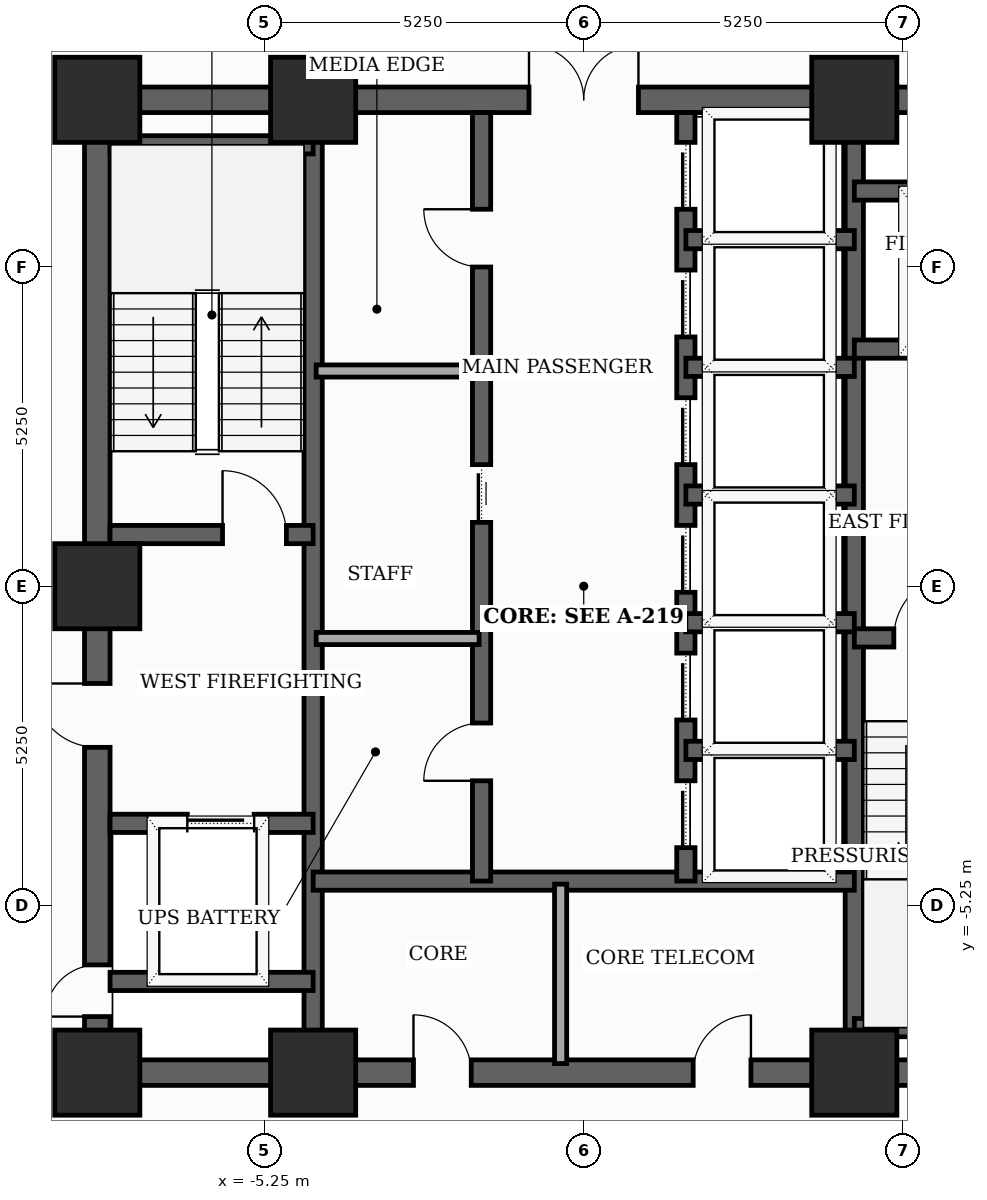
"""IFC4 building model, lengths in metres.
Left out: names, types, materials, properties, quantities, classifications, styles, units other than length and angle.
Written with IfcOpenShell. Run it as: python <this file> out.ifc"""

import sys

from ifc_helpers import new_model, si_unit, direction, frame, frame_2d, origin, origin_2d, place, context, subcontext, project, spatial, rectangle, extrude, element, fill, save


model = new_model("IFC4")
c1 = context("Model", 3, precision=1e-05, world=origin(), true_north=direction((0.0, 1.0)))
c2 = subcontext(c1, "Body", "Model", "MODEL_VIEW")
j1 = project(units=[si_unit("LENGTHUNIT", "METRE"), si_unit("PLANEANGLEUNIT", "RADIAN")], contexts=[c1])
p1 = place(None, origin())
s1 = spatial("IfcSite", under=j1, at=p1, CompositionType="ELEMENT")
p2 = place(p1, origin())
s2 = spatial("IfcBuilding", under=s1, at=p2, CompositionType="ELEMENT")
p3 = place(p2, frame((0.0, 0.0, 165.7)))
s3 = spatial("IfcBuildingStorey", under=s2, at=p3, CompositionType="ELEMENT", Elevation=165.7)
for number, where, z_axis, x_axis in (
    (1, (-8.0, -8.0, 0.0), (0.0, 0.0, 1.0), (1.0, 0.0, 0.0)),
    (2, (-4.45, -8.0, 0.0), (0.0, 0.0, 1.0), (1.0, 0.0, 0.0)),
    (3, (4.45, -8.0, 0.0), (0.0, 0.0, 1.0), (1.0, 0.0, 0.0)),
    (4, (4.45, 8.0, 0.0), (0.0, 0.0, 1.0), (1.0, 0.0, 0.0)),
    (5, (-4.45, 8.0, 0.0), (0.0, 0.0, 1.0), (1.0, 0.0, 0.0)),
    (6, (-8.0, 8.0, 0.0), (0.0, 0.0, 1.0), (1.0, 0.0, 0.0)),
    (7, (-8.0, 0.0, 0.0), (0.0, 0.0, 1.0), (1.0, 0.0, 0.0)),
):
    element("IfcColumn", number, at=place(p3, frame(where, z_axis=z_axis, x_axis=x_axis)), inside=s3, PredefinedType="COLUMN", context=c2, shape_type="SweptSolid", body=[
        extrude(rectangle(XDim=1.4, YDim=1.4, at=origin_2d()), origin(), (0.0, 0.0, 1.0), 3.7),
    ])
p4 = place(p3, frame((-8.0, -8.0, 0.0), z_axis=(0.0, 0.0, 1.0), x_axis=(0.0, 1.0, 0.0)))
e8 = element("IfcWall", 8, at=p4, inside=s3, PredefinedType="SHEAR", context=c2, shape_type="SweptSolid", body=[
    extrude(rectangle(XDim=16.0, YDim=0.42, at=frame_2d((8.0, 0.0))), origin(), (0.0, 0.0, 1.0), 3.5),
])
p5 = place(p4, frame((0.922, 0.0, 0.0)))
e9 = element("IfcOpeningElement", 9, at=p5, cuts=e8, PredefinedType="OPENING", context=c2, shape_type="SweptSolid", body=[
    extrude(rectangle(XDim=0.85, YDim=2.02, at=frame_2d((0.425, 1.01))), frame((0.0, 0.22, 0.0), z_axis=(0.0, -1.0, 0.0), x_axis=(1.0, 0.0, 0.0)), (0.0, 0.0, 1.0), 0.44),
])
p6 = place(p4, frame((5.35, 0.0, 0.0)))
e10 = element("IfcOpeningElement", 10, at=p6, cuts=e8, PredefinedType="OPENING", context=c2, shape_type="SweptSolid", body=[
    extrude(rectangle(XDim=1.05, YDim=2.15, at=frame_2d((0.525, 1.075))), frame((0.0, 0.22, 0.0), z_axis=(0.0, -1.0, 0.0), x_axis=(1.0, 0.0, 0.0)), (0.0, 0.0, 1.0), 0.44),
])
p7 = place(p3, frame((-8.0, -8.0, 0.0), z_axis=(0.0, 0.0, 1.0), x_axis=(1.0, 0.0, 0.0)))
e11 = element("IfcWall", 11, at=p7, inside=s3, PredefinedType="SHEAR", context=c2, shape_type="SweptSolid", body=[
    extrude(rectangle(XDim=16.0, YDim=0.42, at=frame_2d((8.0, 0.0))), origin(), (0.0, 0.0, 1.0), 3.5),
])
p8 = place(p7, frame((5.2, 0.0, 0.0)))
e12 = element("IfcOpeningElement", 12, at=p8, cuts=e11, PredefinedType="OPENING", context=c2, shape_type="SweptSolid", body=[
    extrude(rectangle(XDim=0.95, YDim=2.1, at=frame_2d((0.475, 1.05))), frame((0.0, 0.22, 0.0), z_axis=(0.0, -1.0, 0.0), x_axis=(1.0, 0.0, 0.0)), (0.0, 0.0, 1.0), 0.44),
])
p9 = place(p7, frame((9.8, 0.0, 0.0)))
e13 = element("IfcOpeningElement", 13, at=p9, cuts=e11, PredefinedType="OPENING", context=c2, shape_type="SweptSolid", body=[
    extrude(rectangle(XDim=0.95, YDim=2.1, at=frame_2d((0.475, 1.05))), frame((0.0, 0.22, 0.0), z_axis=(0.0, -1.0, 0.0), x_axis=(1.0, 0.0, 0.0)), (0.0, 0.0, 1.0), 0.44),
])
p10 = place(p3, frame((-8.0, 8.0, 0.0), z_axis=(0.0, 0.0, 1.0), x_axis=(1.0, 0.0, 0.0)))
e14 = element("IfcWall", 14, at=p10, inside=s3, PredefinedType="SHEAR", context=c2, shape_type="SweptSolid", body=[
    extrude(rectangle(XDim=16.0, YDim=0.42, at=frame_2d((8.0, 0.0))), origin(), (0.0, 0.0, 1.0), 3.5),
])
p11 = place(p10, frame((7.1, 0.0, 0.0)))
e15 = element("IfcOpeningElement", 15, at=p11, cuts=e14, PredefinedType="OPENING", context=c2, shape_type="SweptSolid", body=[
    extrude(rectangle(XDim=1.8, YDim=2.15, at=frame_2d((0.9, 1.075))), frame((0.0, 0.22, 0.0), z_axis=(0.0, -1.0, 0.0), x_axis=(1.0, 0.0, 0.0)), (0.0, 0.0, 1.0), 0.44),
])
for number, where, z_axis, x_axis in (
    (16, (-4.45, -7.79, 0.0), (0.0, 0.0, 1.0), (0.0, 1.0, 0.0)),
    (17, (4.45, -7.79, 0.0), (0.0, 0.0, 1.0), (0.0, 1.0, 0.0)),
):
    element("IfcWall", number, at=place(p3, frame(where, z_axis=z_axis, x_axis=x_axis)), inside=s3, PredefinedType="SHEAR", context=c2, shape_type="SweptSolid", body=[
        extrude(rectangle(XDim=15.58, YDim=0.3, at=frame_2d((7.79, 0.0))), origin(), (0.0, 0.0, 1.0), 3.5),
    ])
p12 = place(p3, frame((-7.79, 0.85, 0.0), z_axis=(0.0, 0.0, 1.0), x_axis=(1.0, 0.0, 0.0)))
e18 = element("IfcWall", 18, at=p12, inside=s3, PredefinedType="SHEAR", context=c2, shape_type="SweptSolid", body=[
    extrude(rectangle(XDim=3.34, YDim=0.3, at=frame_2d((1.67, 0.0))), origin(), (0.0, 0.0, 1.0), 3.5),
])
p13 = place(p12, frame((1.85, 0.0, 0.0)))
e19 = element("IfcOpeningElement", 19, at=p13, cuts=e18, PredefinedType="OPENING", context=c2, shape_type="SweptSolid", body=[
    extrude(rectangle(XDim=1.05, YDim=2.15, at=frame_2d((0.525, 1.075))), frame((0.0, 0.16, 0.0), z_axis=(0.0, -1.0, 0.0), x_axis=(1.0, 0.0, 0.0)), (0.0, 0.0, 1.0), 0.32),
])
p14 = place(p3, frame((-7.79, 7.26, 0.0), z_axis=(0.0, 0.0, 1.0), x_axis=(1.0, 0.0, 0.0)))
e20 = element("IfcWall", 20, at=p14, inside=s3, PredefinedType="SHEAR", context=c2, shape_type="SweptSolid", body=[
    extrude(rectangle(XDim=3.34, YDim=0.3, at=frame_2d((1.67, 0.0))), origin(), (0.0, 0.0, 1.0), 3.5),
])
p15 = place(p3, frame((4.45, -0.85, 0.0), z_axis=(0.0, 0.0, 1.0), x_axis=(1.0, 0.0, 0.0)))
e21 = element("IfcWall", 21, at=p15, inside=s3, PredefinedType="SHEAR", context=c2, shape_type="SweptSolid", body=[
    extrude(rectangle(XDim=3.34, YDim=0.3, at=frame_2d((1.67, 0.0))), origin(), (0.0, 0.0, 1.0), 3.5),
])
p16 = place(p15, frame((0.65, 0.0, 0.0)))
e22 = element("IfcOpeningElement", 22, at=p16, cuts=e21, PredefinedType="OPENING", context=c2, shape_type="SweptSolid", body=[
    extrude(rectangle(XDim=1.05, YDim=2.15, at=frame_2d((0.525, 1.075))), frame((0.0, 0.16, 0.0), z_axis=(0.0, -1.0, 0.0), x_axis=(1.0, 0.0, 0.0)), (0.0, 0.0, 1.0), 0.32),
])
p17 = place(p3, frame((4.45, -7.26, 0.0), z_axis=(0.0, 0.0, 1.0), x_axis=(1.0, 0.0, 0.0)))
e23 = element("IfcWall", 23, at=p17, inside=s3, PredefinedType="SHEAR", context=c2, shape_type="SweptSolid", body=[
    extrude(rectangle(XDim=3.55, YDim=0.3, at=frame_2d((1.775, 0.0))), origin(), (0.0, 0.0, 1.0), 3.5),
])
p18 = place(p3, frame((-7.79, -3.9, 0.0), z_axis=(0.0, 0.0, 1.0), x_axis=(1.0, 0.0, 0.0)))
e24 = element("IfcWall", 24, at=p18, inside=s3, PredefinedType="SHEAR", context=c2, shape_type="SweptSolid", body=[
    extrude(rectangle(XDim=3.34, YDim=0.3, at=frame_2d((1.67, 0.0))), origin(), (0.0, 0.0, 1.0), 3.5),
])
p19 = place(p18, frame((1.27, 0.0, 0.0)))
e25 = element("IfcOpeningElement", 25, at=p19, cuts=e24, PredefinedType="OPENING", context=c2, shape_type="SweptSolid", body=[
    extrude(rectangle(XDim=1.1, YDim=2.1, at=frame_2d((0.55, 1.05))), frame((0.0, 0.16, 0.0), z_axis=(0.0, -1.0, 0.0), x_axis=(1.0, 0.0, 0.0)), (0.0, 0.0, 1.0), 0.32),
])
p20 = place(p3, frame((-7.79, -6.5, 0.0), z_axis=(0.0, 0.0, 1.0), x_axis=(1.0, 0.0, 0.0)))
e26 = element("IfcWall", 26, at=p20, inside=s3, PredefinedType="SHEAR", context=c2, shape_type="SweptSolid", body=[
    extrude(rectangle(XDim=3.34, YDim=0.3, at=frame_2d((1.67, 0.0))), origin(), (0.0, 0.0, 1.0), 3.5),
])
p21 = place(p3, frame((4.45, 3.9, 0.0), z_axis=(0.0, 0.0, 1.0), x_axis=(1.0, 0.0, 0.0)))
e27 = element("IfcWall", 27, at=p21, inside=s3, PredefinedType="SHEAR", context=c2, shape_type="SweptSolid", body=[
    extrude(rectangle(XDim=3.34, YDim=0.3, at=frame_2d((1.67, 0.0))), origin(), (0.0, 0.0, 1.0), 3.5),
])
p22 = place(p21, frame((1.18, 0.0, 0.0)))
e28 = element("IfcOpeningElement", 28, at=p22, cuts=e27, PredefinedType="OPENING", context=c2, shape_type="SweptSolid", body=[
    extrude(rectangle(XDim=1.1, YDim=2.1, at=frame_2d((0.55, 1.05))), frame((0.0, 0.16, 0.0), z_axis=(0.0, -1.0, 0.0), x_axis=(1.0, 0.0, 0.0)), (0.0, 0.0, 1.0), 0.32),
])
p23 = place(p3, frame((4.45, 6.5, 0.0), z_axis=(0.0, 0.0, 1.0), x_axis=(1.0, 0.0, 0.0)))
e29 = element("IfcWall", 29, at=p23, inside=s3, PredefinedType="SHEAR", context=c2, shape_type="SweptSolid", body=[
    extrude(rectangle(XDim=3.34, YDim=0.3, at=frame_2d((1.67, 0.0))), origin(), (0.0, 0.0, 1.0), 3.5),
])
p24 = place(p3, frame((-4.45, -4.85, 0.0), z_axis=(0.0, 0.0, 1.0), x_axis=(1.0, 0.0, 0.0)))
e30 = element("IfcWall", 30, at=p24, inside=s3, PredefinedType="SHEAR", context=c2, shape_type="SweptSolid", body=[
    extrude(rectangle(XDim=8.9, YDim=0.3, at=frame_2d((4.45, 0.0))), origin(), (0.0, 0.0, 1.0), 3.5),
])
p25 = place(p3, frame((-1.68, -4.85, 0.0), z_axis=(0.0, 0.0, 1.0), x_axis=(0.0, 1.0, 0.0)))
e31 = element("IfcWall", 31, at=p25, inside=s3, PredefinedType="SHEAR", context=c2, shape_type="SweptSolid", body=[
    extrude(rectangle(XDim=12.64, YDim=0.3, at=frame_2d((6.32, 0.0))), origin(), (0.0, 0.0, 1.0), 3.5),
])
p26 = place(p25, frame((1.65, 0.0, 0.0)))
e32 = element("IfcOpeningElement", 32, at=p26, cuts=e31, PredefinedType="OPENING", context=c2, shape_type="SweptSolid", body=[
    extrude(rectangle(XDim=0.95, YDim=2.1, at=frame_2d((0.475, 1.05))), frame((0.0, 0.16, 0.0), z_axis=(0.0, -1.0, 0.0), x_axis=(1.0, 0.0, 0.0)), (0.0, 0.0, 1.0), 0.32),
])
p27 = place(p25, frame((5.9, 0.0, 0.0)))
e33 = element("IfcOpeningElement", 33, at=p27, cuts=e31, PredefinedType="OPENING", context=c2, shape_type="SweptSolid", body=[
    extrude(rectangle(XDim=0.95, YDim=2.1, at=frame_2d((0.475, 1.05))), frame((0.0, 0.16, 0.0), z_axis=(0.0, -1.0, 0.0), x_axis=(1.0, 0.0, 0.0)), (0.0, 0.0, 1.0), 0.32),
])
p28 = place(p25, frame((10.1, 0.0, 0.0)))
e34 = element("IfcOpeningElement", 34, at=p28, cuts=e31, PredefinedType="OPENING", context=c2, shape_type="SweptSolid", body=[
    extrude(rectangle(XDim=0.95, YDim=2.1, at=frame_2d((0.475, 1.05))), frame((0.0, 0.16, 0.0), z_axis=(0.0, -1.0, 0.0), x_axis=(1.0, 0.0, 0.0)), (0.0, 0.0, 1.0), 0.32),
])
p29 = place(p3, frame((1.68, -4.85, 0.0), z_axis=(0.0, 0.0, 1.0), x_axis=(0.0, 1.0, 0.0)))
e35 = element("IfcWall", 35, at=p29, inside=s3, PredefinedType="SHEAR", context=c2, shape_type="SweptSolid", body=[
    extrude(rectangle(XDim=12.64, YDim=0.3, at=frame_2d((6.32, 0.0))), origin(), (0.0, 0.0, 1.0), 3.5),
])
p30 = place(p29, frame((0.55, 0.0, 0.0)))
e36 = element("IfcOpeningElement", 36, at=p30, cuts=e35, PredefinedType="OPENING", context=c2, shape_type="SweptSolid", body=[
    extrude(rectangle(XDim=1.1, YDim=2.1, at=frame_2d((0.55, 1.05))), frame((0.0, 0.16, 0.0), z_axis=(0.0, -1.0, 0.0), x_axis=(1.0, 0.0, 0.0)), (0.0, 0.0, 1.0), 0.32),
])
p31 = place(p29, frame((2.65, 0.0, 0.0)))
e37 = element("IfcOpeningElement", 37, at=p31, cuts=e35, PredefinedType="OPENING", context=c2, shape_type="SweptSolid", body=[
    extrude(rectangle(XDim=1.1, YDim=2.1, at=frame_2d((0.55, 1.05))), frame((0.0, 0.16, 0.0), z_axis=(0.0, -1.0, 0.0), x_axis=(1.0, 0.0, 0.0)), (0.0, 0.0, 1.0), 0.32),
])
p32 = place(p29, frame((4.75, 0.0, 0.0)))
e38 = element("IfcOpeningElement", 38, at=p32, cuts=e35, PredefinedType="OPENING", context=c2, shape_type="SweptSolid", body=[
    extrude(rectangle(XDim=1.1, YDim=2.1, at=frame_2d((0.55, 1.05))), frame((0.0, 0.16, 0.0), z_axis=(0.0, -1.0, 0.0), x_axis=(1.0, 0.0, 0.0)), (0.0, 0.0, 1.0), 0.32),
])
p33 = place(p29, frame((6.85, 0.0, 0.0)))
e39 = element("IfcOpeningElement", 39, at=p33, cuts=e35, PredefinedType="OPENING", context=c2, shape_type="SweptSolid", body=[
    extrude(rectangle(XDim=1.1, YDim=2.1, at=frame_2d((0.55, 1.05))), frame((0.0, 0.16, 0.0), z_axis=(0.0, -1.0, 0.0), x_axis=(1.0, 0.0, 0.0)), (0.0, 0.0, 1.0), 0.32),
])
p34 = place(p29, frame((8.95, 0.0, 0.0)))
e40 = element("IfcOpeningElement", 40, at=p34, cuts=e35, PredefinedType="OPENING", context=c2, shape_type="SweptSolid", body=[
    extrude(rectangle(XDim=1.1, YDim=2.1, at=frame_2d((0.55, 1.05))), frame((0.0, 0.16, 0.0), z_axis=(0.0, -1.0, 0.0), x_axis=(1.0, 0.0, 0.0)), (0.0, 0.0, 1.0), 0.32),
])
p35 = place(p29, frame((11.05, 0.0, 0.0)))
e41 = element("IfcOpeningElement", 41, at=p35, cuts=e35, PredefinedType="OPENING", context=c2, shape_type="SweptSolid", body=[
    extrude(rectangle(XDim=1.1, YDim=2.1, at=frame_2d((0.55, 1.05))), frame((0.0, 0.16, 0.0), z_axis=(0.0, -1.0, 0.0), x_axis=(1.0, 0.0, 0.0)), (0.0, 0.0, 1.0), 0.32),
])
for number, where, z_axis, x_axis in (
    (42, (1.68, 1.5, 0.0), (0.0, 0.0, 1.0), (1.0, 0.0, 0.0)),
    (43, (1.68, 3.6, 0.0), (0.0, 0.0, 1.0), (1.0, 0.0, 0.0)),
    (44, (1.68, 5.7, 0.0), (0.0, 0.0, 1.0), (1.0, 0.0, 0.0)),
    (45, (1.68, -2.7, 0.0), (0.0, 0.0, 1.0), (1.0, 0.0, 0.0)),
    (46, (1.68, -0.6, 0.0), (0.0, 0.0, 1.0), (1.0, 0.0, 0.0)),
):
    element("IfcWall", number, at=place(p3, frame(where, z_axis=z_axis, x_axis=x_axis)), inside=s3, PredefinedType="SHEAR", context=c2, shape_type="SweptSolid", body=[
        extrude(rectangle(XDim=2.77, YDim=0.3, at=frame_2d((1.385, 0.0))), origin(), (0.0, 0.0, 1.0), 3.5),
    ])
p36 = place(p3, frame((-0.38, -7.85, 0.0), z_axis=(0.0, 0.0, 1.0), x_axis=(0.0, 1.0, 0.0)))
e47 = element("IfcWall", 47, at=p36, inside=s3, PredefinedType="SOLIDWALL", context=c2, shape_type="SweptSolid", body=[
    extrude(rectangle(XDim=2.95, YDim=0.2, at=frame_2d((1.475, 0.0))), origin(), (0.0, 0.0, 1.0), 2.885),
])
for number, where, z_axis, x_axis in (
    (48, (-4.4, -0.86, 0.0), (0.0, 0.0, 1.0), (1.0, 0.0, 0.0)),
    (49, (-4.4, 3.54, 0.0), (0.0, 0.0, 1.0), (1.0, 0.0, 0.0)),
):
    element("IfcWall", number, at=place(p3, frame(where, z_axis=z_axis, x_axis=x_axis)), inside=s3, PredefinedType="SOLIDWALL", context=c2, shape_type="SweptSolid", body=[
        extrude(rectangle(XDim=2.68, YDim=0.2, at=frame_2d((1.34, 0.0))), origin(), (0.0, 0.0, 1.0), 3.5),
    ])
p37 = place(p5, origin())
e50 = element("IfcDoor", 50, at=p37, inside=s3, OperationType="SINGLE_SWING_LEFT", PredefinedType="TRAPDOOR", context=c2, shape_type="SweptSolid", body=[
    extrude(rectangle(XDim=0.85, YDim=2.02, at=frame_2d((0.425, 1.01))), frame((0.0, 0.025, 0.0), z_axis=(0.0, -1.0, 0.0), x_axis=(1.0, 0.0, 0.0)), (0.0, 0.0, 1.0), 0.05),
])
fill(e9, e50)
p38 = place(p6, origin())
e51 = element("IfcDoor", 51, at=p38, inside=s3, OperationType="SINGLE_SWING_RIGHT", PredefinedType="DOOR", context=c2, shape_type="SweptSolid", body=[
    extrude(rectangle(XDim=1.05, YDim=2.15, at=frame_2d((0.525, 1.075))), frame((0.0, 0.025, 0.0), z_axis=(0.0, -1.0, 0.0), x_axis=(1.0, 0.0, 0.0)), (0.0, 0.0, 1.0), 0.05),
])
fill(e10, e51)
p39 = place(p8, origin())
e52 = element("IfcDoor", 52, at=p39, inside=s3, OperationType="SINGLE_SWING_LEFT", PredefinedType="DOOR", context=c2, shape_type="SweptSolid", body=[
    extrude(rectangle(XDim=0.95, YDim=2.1, at=frame_2d((0.475, 1.05))), frame((0.0, 0.025, 0.0), z_axis=(0.0, -1.0, 0.0), x_axis=(1.0, 0.0, 0.0)), (0.0, 0.0, 1.0), 0.05),
])
fill(e12, e52)
p40 = place(p9, origin())
e53 = element("IfcDoor", 53, at=p40, inside=s3, OperationType="SINGLE_SWING_RIGHT", PredefinedType="DOOR", context=c2, shape_type="SweptSolid", body=[
    extrude(rectangle(XDim=0.95, YDim=2.1, at=frame_2d((0.475, 1.05))), frame((0.0, 0.025, 0.0), z_axis=(0.0, -1.0, 0.0), x_axis=(1.0, 0.0, 0.0)), (0.0, 0.0, 1.0), 0.05),
])
fill(e13, e53)
p41 = place(p11, origin())
e54 = element("IfcDoor", 54, at=p41, inside=s3, OperationType="DOUBLE_DOOR_SINGLE_SWING", PredefinedType="DOOR", context=c2, shape_type="SweptSolid", body=[
    extrude(rectangle(XDim=1.8, YDim=2.15, at=frame_2d((0.9, 1.075))), frame((0.0, 0.025, 0.0), z_axis=(0.0, -1.0, 0.0), x_axis=(1.0, 0.0, 0.0)), (0.0, 0.0, 1.0), 0.05),
])
fill(e15, e54)
p42 = place(p13, origin())
e55 = element("IfcDoor", 55, at=p42, inside=s3, OperationType="SINGLE_SWING_LEFT", PredefinedType="DOOR", context=c2, shape_type="SweptSolid", body=[
    extrude(rectangle(XDim=1.05, YDim=2.15, at=frame_2d((0.525, 1.075))), frame((0.0, 0.025, 0.0), z_axis=(0.0, -1.0, 0.0), x_axis=(1.0, 0.0, 0.0)), (0.0, 0.0, 1.0), 0.05),
])
fill(e19, e55)
p43 = place(p16, origin())
e56 = element("IfcDoor", 56, at=p43, inside=s3, OperationType="SINGLE_SWING_RIGHT", PredefinedType="DOOR", context=c2, shape_type="SweptSolid", body=[
    extrude(rectangle(XDim=1.05, YDim=2.15, at=frame_2d((0.525, 1.075))), frame((0.0, 0.025, 0.0), z_axis=(0.0, -1.0, 0.0), x_axis=(1.0, 0.0, 0.0)), (0.0, 0.0, 1.0), 0.05),
])
fill(e22, e56)
p44 = place(p19, origin())
e57 = element("IfcDoor", 57, at=p44, inside=s3, OperationType="SLIDING_TO_LEFT", PredefinedType="DOOR", context=c2, shape_type="SweptSolid", body=[
    extrude(rectangle(XDim=1.1, YDim=2.1, at=frame_2d((0.55, 1.05))), frame((0.0, 0.025, 0.0), z_axis=(0.0, -1.0, 0.0), x_axis=(1.0, 0.0, 0.0)), (0.0, 0.0, 1.0), 0.05),
])
fill(e25, e57)
p45 = place(p26, origin())
e58 = element("IfcDoor", 58, at=p45, inside=s3, OperationType="SINGLE_SWING_LEFT", PredefinedType="DOOR", context=c2, shape_type="SweptSolid", body=[
    extrude(rectangle(XDim=0.95, YDim=2.1, at=frame_2d((0.475, 1.05))), frame((0.0, 0.025, 0.0), z_axis=(0.0, -1.0, 0.0), x_axis=(1.0, 0.0, 0.0)), (0.0, 0.0, 1.0), 0.05),
])
fill(e32, e58)
p46 = place(p27, origin())
e59 = element("IfcDoor", 59, at=p46, inside=s3, OperationType="SLIDING_TO_LEFT", PredefinedType="DOOR", context=c2, shape_type="SweptSolid", body=[
    extrude(rectangle(XDim=0.95, YDim=2.1, at=frame_2d((0.475, 1.05))), frame((0.0, 0.025, 0.0), z_axis=(0.0, -1.0, 0.0), x_axis=(1.0, 0.0, 0.0)), (0.0, 0.0, 1.0), 0.05),
])
fill(e33, e59)
p47 = place(p28, origin())
e60 = element("IfcDoor", 60, at=p47, inside=s3, OperationType="SINGLE_SWING_RIGHT", PredefinedType="DOOR", context=c2, shape_type="SweptSolid", body=[
    extrude(rectangle(XDim=0.95, YDim=2.1, at=frame_2d((0.475, 1.05))), frame((0.0, 0.025, 0.0), z_axis=(0.0, -1.0, 0.0), x_axis=(1.0, 0.0, 0.0)), (0.0, 0.0, 1.0), 0.05),
])
fill(e34, e60)
p48 = place(p30, origin())
e61 = element("IfcDoor", 61, at=p48, inside=s3, OperationType="SLIDING_TO_LEFT", PredefinedType="DOOR", context=c2, shape_type="SweptSolid", body=[
    extrude(rectangle(XDim=1.1, YDim=2.1, at=frame_2d((0.55, 1.05))), frame((0.0, 0.025, 0.0), z_axis=(0.0, -1.0, 0.0), x_axis=(1.0, 0.0, 0.0)), (0.0, 0.0, 1.0), 0.05),
])
fill(e36, e61)
p49 = place(p31, origin())
e62 = element("IfcDoor", 62, at=p49, inside=s3, OperationType="SLIDING_TO_LEFT", PredefinedType="DOOR", context=c2, shape_type="SweptSolid", body=[
    extrude(rectangle(XDim=1.1, YDim=2.1, at=frame_2d((0.55, 1.05))), frame((0.0, 0.025, 0.0), z_axis=(0.0, -1.0, 0.0), x_axis=(1.0, 0.0, 0.0)), (0.0, 0.0, 1.0), 0.05),
])
fill(e37, e62)
p50 = place(p32, origin())
e63 = element("IfcDoor", 63, at=p50, inside=s3, OperationType="SLIDING_TO_LEFT", PredefinedType="DOOR", context=c2, shape_type="SweptSolid", body=[
    extrude(rectangle(XDim=1.1, YDim=2.1, at=frame_2d((0.55, 1.05))), frame((0.0, 0.025, 0.0), z_axis=(0.0, -1.0, 0.0), x_axis=(1.0, 0.0, 0.0)), (0.0, 0.0, 1.0), 0.05),
])
fill(e38, e63)
p51 = place(p33, origin())
e64 = element("IfcDoor", 64, at=p51, inside=s3, OperationType="SLIDING_TO_LEFT", PredefinedType="DOOR", context=c2, shape_type="SweptSolid", body=[
    extrude(rectangle(XDim=1.1, YDim=2.1, at=frame_2d((0.55, 1.05))), frame((0.0, 0.025, 0.0), z_axis=(0.0, -1.0, 0.0), x_axis=(1.0, 0.0, 0.0)), (0.0, 0.0, 1.0), 0.05),
])
fill(e39, e64)
p52 = place(p34, origin())
e65 = element("IfcDoor", 65, at=p52, inside=s3, OperationType="SLIDING_TO_LEFT", PredefinedType="DOOR", context=c2, shape_type="SweptSolid", body=[
    extrude(rectangle(XDim=1.1, YDim=2.1, at=frame_2d((0.55, 1.05))), frame((0.0, 0.025, 0.0), z_axis=(0.0, -1.0, 0.0), x_axis=(1.0, 0.0, 0.0)), (0.0, 0.0, 1.0), 0.05),
])
fill(e40, e65)
p53 = place(p35, origin())
e66 = element("IfcDoor", 66, at=p53, inside=s3, OperationType="SLIDING_TO_LEFT", PredefinedType="DOOR", context=c2, shape_type="SweptSolid", body=[
    extrude(rectangle(XDim=1.1, YDim=2.1, at=frame_2d((0.55, 1.05))), frame((0.0, 0.025, 0.0), z_axis=(0.0, -1.0, 0.0), x_axis=(1.0, 0.0, 0.0)), (0.0, 0.0, 1.0), 0.05),
])
fill(e41, e66)
save(model, sys.argv[1])
